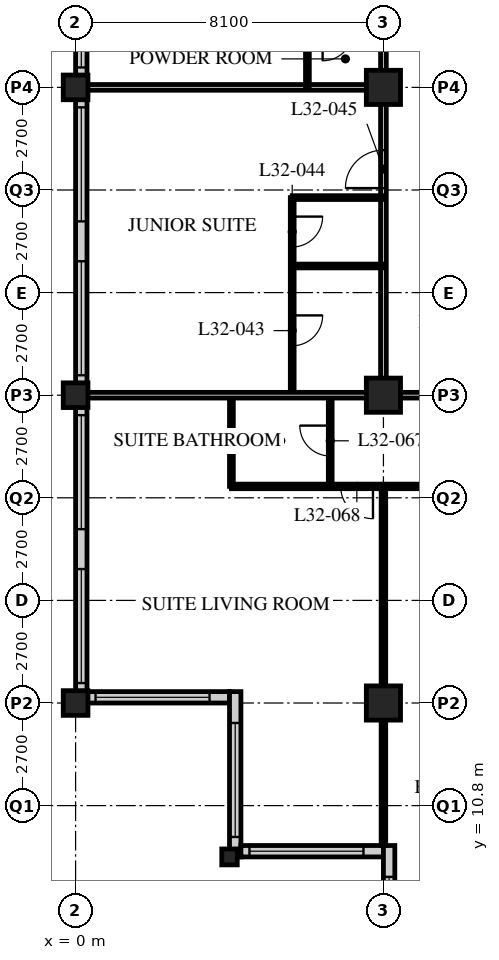
"""IFC4 building model, lengths in metres.
Left out: names, types, materials, properties, quantities, classifications, styles, units other than length and angle.
Written with IfcOpenShell. Run it as: python <this file> out.ifc"""

import sys

from ifc_helpers import new_model, si_unit, direction, frame, frame_2d, origin, origin_2d, place, context, subcontext, project, spatial, rectangle, hollow_rectangle, i_section, extrude, element, fill, save


model = new_model("IFC4")
c1 = context("Model", 3, precision=1e-05, world=origin(), true_north=direction((0.0, 1.0)))
c2 = subcontext(c1, "Body", "Model", "MODEL_VIEW")
j1 = project(units=[si_unit("LENGTHUNIT", "METRE"), si_unit("PLANEANGLEUNIT", "RADIAN")], contexts=[c1])
p1 = place(None, origin())
s1 = spatial("IfcSite", under=j1, at=p1, CompositionType="ELEMENT")
p2 = place(p1, origin())
s2 = spatial("IfcBuilding", under=s1, at=p2, CompositionType="ELEMENT")
p3 = place(p2, frame((0.0, 0.0, 127.2)))
s3 = spatial("IfcBuildingStorey", under=s2, at=p3, CompositionType="ELEMENT", Elevation=127.2)
for number, where, z_axis, x_axis in (
    (1, (0.0, 13.5, 0.0), (0.0, 0.0, 1.0), (1.0, 0.0, 0.0)),
    (2, (0.0, 21.6, 0.0), (0.0, 0.0, 1.0), (1.0, 0.0, 0.0)),
    (3, (0.0, 29.7, 0.0), (0.0, 0.0, 1.0), (1.0, 0.0, 0.0)),
):
    element("IfcColumn", number, at=place(p3, frame(where, z_axis=z_axis, x_axis=x_axis)), inside=s3, PredefinedType="COLUMN", context=c2, shape_type="SweptSolid", body=[
        extrude(hollow_rectangle(XDim=0.65, YDim=0.65, WallThickness=0.055, at=origin_2d()), origin(), (0.0, 0.0, 1.0), 3.4),
    ])
p4 = place(p3, frame((4.05, 9.45, 0.0), z_axis=(0.0, 0.0, 1.0), x_axis=(1.0, 0.0, 0.0)))
e4 = element("IfcColumn", 4, at=p4, inside=s3, PredefinedType="COLUMN", context=c2, shape_type="SweptSolid", body=[
    extrude(i_section(OverallWidth=0.407, OverallDepth=0.419, WebThickness=0.031, FlangeThickness=0.049, FilletRadius=0.015, at=origin_2d()), origin(), (0.0, 0.0, 1.0), 3.4),
])
for number, where, z_axis, x_axis in (
    (5, (8.1, 13.5, 0.0), (0.0, 0.0, 1.0), (1.0, 0.0, 0.0)),
    (6, (8.1, 21.6, 0.0), (0.0, 0.0, 1.0), (1.0, 0.0, 0.0)),
    (7, (8.1, 29.7, 0.0), (0.0, 0.0, 1.0), (1.0, 0.0, 0.0)),
):
    element("IfcColumn", number, at=place(p3, frame(where, z_axis=z_axis, x_axis=x_axis)), inside=s3, PredefinedType="COLUMN", context=c2, shape_type="SweptSolid", body=[
        extrude(hollow_rectangle(XDim=0.9, YDim=0.9, WallThickness=0.09, at=origin_2d()), origin(), (0.0, 0.0, 1.0), 3.4),
    ])
p5 = place(p3, frame((0.15, 45.6, 0.0), z_axis=(0.0, 0.0, 1.0), x_axis=(0.0, -1.0, 0.0)))
e8 = element("IfcWall", 8, at=p5, inside=s3, PredefinedType="SOLIDWALL", context=c2, shape_type="SweptSolid", body=[
    extrude(rectangle(XDim=32.1, YDim=0.3, at=frame_2d((16.05, 0.0))), origin(), (0.0, 0.0, 1.0), 3.19),
])
p6 = place(p5, frame((0.225, 0.0, 0.9)))
e9 = element("IfcOpeningElement", 9, at=p6, cuts=e8, PredefinedType="OPENING", context=c2, shape_type="SweptSolid", body=[
    extrude(rectangle(XDim=3.0, YDim=2.0, at=frame_2d((1.5, 1.0))), frame((0.0, 0.16, 0.0), z_axis=(0.0, -1.0, 0.0), x_axis=(1.0, 0.0, 0.0)), (0.0, 0.0, 1.0), 0.32),
])
p7 = place(p5, frame((4.275, 0.0, 0.9)))
e10 = element("IfcOpeningElement", 10, at=p7, cuts=e8, PredefinedType="OPENING", context=c2, shape_type="SweptSolid", body=[
    extrude(rectangle(XDim=3.0, YDim=2.0, at=frame_2d((1.5, 1.0))), frame((0.0, 0.16, 0.0), z_axis=(0.0, -1.0, 0.0), x_axis=(1.0, 0.0, 0.0)), (0.0, 0.0, 1.0), 0.32),
])
p8 = place(p5, frame((8.325, 0.0, 0.9)))
e11 = element("IfcOpeningElement", 11, at=p8, cuts=e8, PredefinedType="OPENING", context=c2, shape_type="SweptSolid", body=[
    extrude(rectangle(XDim=3.0, YDim=2.0, at=frame_2d((1.5, 1.0))), frame((0.0, 0.16, 0.0), z_axis=(0.0, -1.0, 0.0), x_axis=(1.0, 0.0, 0.0)), (0.0, 0.0, 1.0), 0.32),
])
p9 = place(p5, frame((12.375, 0.0, 0.9)))
e12 = element("IfcOpeningElement", 12, at=p9, cuts=e8, PredefinedType="OPENING", context=c2, shape_type="SweptSolid", body=[
    extrude(rectangle(XDim=3.0, YDim=2.0, at=frame_2d((1.5, 1.0))), frame((0.0, 0.16, 0.0), z_axis=(0.0, -1.0, 0.0), x_axis=(1.0, 0.0, 0.0)), (0.0, 0.0, 1.0), 0.32),
])
p10 = place(p5, frame((16.425, 0.0, 0.9)))
e13 = element("IfcOpeningElement", 13, at=p10, cuts=e8, PredefinedType="OPENING", context=c2, shape_type="SweptSolid", body=[
    extrude(rectangle(XDim=3.0, YDim=2.0, at=frame_2d((1.5, 1.0))), frame((0.0, 0.16, 0.0), z_axis=(0.0, -1.0, 0.0), x_axis=(1.0, 0.0, 0.0)), (0.0, 0.0, 1.0), 0.32),
])
p11 = place(p5, frame((20.475, 0.0, 0.9)))
e14 = element("IfcOpeningElement", 14, at=p11, cuts=e8, PredefinedType="OPENING", context=c2, shape_type="SweptSolid", body=[
    extrude(rectangle(XDim=3.0, YDim=2.0, at=frame_2d((1.5, 1.0))), frame((0.0, 0.16, 0.0), z_axis=(0.0, -1.0, 0.0), x_axis=(1.0, 0.0, 0.0)), (0.0, 0.0, 1.0), 0.32),
])
p12 = place(p5, frame((24.525, 0.0, 0.9)))
e15 = element("IfcOpeningElement", 15, at=p12, cuts=e8, PredefinedType="OPENING", context=c2, shape_type="SweptSolid", body=[
    extrude(rectangle(XDim=3.0, YDim=2.0, at=frame_2d((1.5, 1.0))), frame((0.0, 0.16, 0.0), z_axis=(0.0, -1.0, 0.0), x_axis=(1.0, 0.0, 0.0)), (0.0, 0.0, 1.0), 0.32),
])
p13 = place(p5, frame((28.575, 0.0, 0.9)))
e16 = element("IfcOpeningElement", 16, at=p13, cuts=e8, PredefinedType="OPENING", context=c2, shape_type="SweptSolid", body=[
    extrude(rectangle(XDim=3.0, YDim=2.0, at=frame_2d((1.5, 1.0))), frame((0.0, 0.16, 0.0), z_axis=(0.0, -1.0, 0.0), x_axis=(1.0, 0.0, 0.0)), (0.0, 0.0, 1.0), 0.32),
])
p14 = place(p3, frame((0.3, 13.65, 0.0), z_axis=(0.0, 0.0, 1.0), x_axis=(1.0, 0.0, 0.0)))
e17 = element("IfcWall", 17, at=p14, inside=s3, PredefinedType="SOLIDWALL", context=c2, shape_type="SweptSolid", body=[
    extrude(rectangle(XDim=3.75, YDim=0.3, at=frame_2d((1.875, 0.0))), origin(), (0.0, 0.0, 1.0), 3.19),
])
p15 = place(p14, frame((0.225, 0.0, 0.9)))
e18 = element("IfcOpeningElement", 18, at=p15, cuts=e17, PredefinedType="OPENING", context=c2, shape_type="SweptSolid", body=[
    extrude(rectangle(XDim=3.0, YDim=1.5, at=frame_2d((1.5, 0.75))), frame((0.0, 0.16, 0.0), z_axis=(0.0, -1.0, 0.0), x_axis=(1.0, 0.0, 0.0)), (0.0, 0.0, 1.0), 0.32),
])
p16 = place(p3, frame((4.2, 13.8, 0.0), z_axis=(0.0, 0.0, 1.0), x_axis=(0.0, -1.0, 0.0)))
e19 = element("IfcWall", 19, at=p16, inside=s3, PredefinedType="SOLIDWALL", context=c2, shape_type="SweptSolid", body=[
    extrude(rectangle(XDim=4.35, YDim=0.3, at=frame_2d((2.175, 0.0))), origin(), (0.0, 0.0, 1.0), 3.19),
])
p17 = place(p16, frame((0.825, 0.0, 0.9)))
e20 = element("IfcOpeningElement", 20, at=p17, cuts=e19, PredefinedType="OPENING", context=c2, shape_type="SweptSolid", body=[
    extrude(rectangle(XDim=3.0, YDim=1.5, at=frame_2d((1.5, 0.75))), frame((0.0, 0.16, 0.0), z_axis=(0.0, -1.0, 0.0), x_axis=(1.0, 0.0, 0.0)), (0.0, 0.0, 1.0), 0.32),
])
p18 = place(p3, frame((4.35, 9.6, 0.0), z_axis=(0.0, 0.0, 1.0), x_axis=(1.0, 0.0, 0.0)))
e21 = element("IfcWall", 21, at=p18, inside=s3, PredefinedType="SOLIDWALL", context=c2, shape_type="SweptSolid", body=[
    extrude(rectangle(XDim=3.75, YDim=0.3, at=frame_2d((1.875, 0.0))), origin(), (0.0, 0.0, 1.0), 3.19),
])
p19 = place(p18, frame((0.225, 0.0, 0.9)))
e22 = element("IfcOpeningElement", 22, at=p19, cuts=e21, PredefinedType="OPENING", context=c2, shape_type="SweptSolid", body=[
    extrude(rectangle(XDim=3.0, YDim=1.5, at=frame_2d((1.5, 0.75))), frame((0.0, 0.16, 0.0), z_axis=(0.0, -1.0, 0.0), x_axis=(1.0, 0.0, 0.0)), (0.0, 0.0, 1.0), 0.32),
])
p20 = place(p3, frame((8.25, 9.75, 0.0), z_axis=(0.0, 0.0, 1.0), x_axis=(0.0, -1.0, 0.0)))
e23 = element("IfcWall", 23, at=p20, inside=s3, PredefinedType="SOLIDWALL", context=c2, shape_type="SweptSolid", body=[
    extrude(rectangle(XDim=4.35, YDim=0.3, at=frame_2d((2.175, 0.0))), origin(), (0.0, 0.0, 1.0), 3.19),
])
p21 = place(p20, frame((0.825, 0.0, 0.9)))
e24 = element("IfcOpeningElement", 24, at=p21, cuts=e23, PredefinedType="OPENING", context=c2, shape_type="SweptSolid", body=[
    extrude(rectangle(XDim=3.0, YDim=1.5, at=frame_2d((1.5, 0.75))), frame((0.0, 0.16, 0.0), z_axis=(0.0, -1.0, 0.0), x_axis=(1.0, 0.0, 0.0)), (0.0, 0.0, 1.0), 0.32),
])
p22 = place(p3, frame((8.1, 21.6, 0.0), z_axis=(0.0, 0.0, 1.0), x_axis=(1.0, 0.0, 0.0)))
e25 = element("IfcWall", 25, at=p22, inside=s3, PredefinedType="PARTITIONING", context=c2, shape_type="SweptSolid", body=[
    extrude(rectangle(XDim=40.5, YDim=0.15, at=frame_2d((20.25, 0.0))), origin(), (0.0, 0.0, 1.0), 2.578),
])
p23 = place(p22, frame((9.625, 0.0, 0.0)))
e26 = element("IfcOpeningElement", 26, at=p23, cuts=e25, PredefinedType="OPENING", context=c2, shape_type="SweptSolid", body=[
    extrude(rectangle(XDim=1.0, YDim=2.1, at=frame_2d((0.5, 1.05))), frame((0.0, 0.085, 0.0), z_axis=(0.0, -1.0, 0.0), x_axis=(1.0, 0.0, 0.0)), (0.0, 0.0, 1.0), 0.17),
])
p24 = place(p22, frame((21.775, 0.0, 0.0)))
e27 = element("IfcOpeningElement", 27, at=p24, cuts=e25, PredefinedType="OPENING", context=c2, shape_type="SweptSolid", body=[
    extrude(rectangle(XDim=1.0, YDim=2.1, at=frame_2d((0.5, 1.05))), frame((0.0, 0.085, 0.0), z_axis=(0.0, -1.0, 0.0), x_axis=(1.0, 0.0, 0.0)), (0.0, 0.0, 1.0), 0.17),
])
p25 = place(p22, frame((28.95, 0.0, 0.0)))
e28 = element("IfcOpeningElement", 28, at=p25, cuts=e25, PredefinedType="OPENING", context=c2, shape_type="SweptSolid", body=[
    extrude(rectangle(XDim=1.0, YDim=2.1, at=frame_2d((0.5, 1.05))), frame((0.0, 0.085, 0.0), z_axis=(0.0, -1.0, 0.0), x_axis=(1.0, 0.0, 0.0)), (0.0, 0.0, 1.0), 0.17),
])
p26 = place(p22, frame((34.85, 0.0, 0.0)))
e29 = element("IfcOpeningElement", 29, at=p26, cuts=e25, PredefinedType="OPENING", context=c2, shape_type="SweptSolid", body=[
    extrude(rectangle(XDim=1.0, YDim=2.1, at=frame_2d((0.5, 1.05))), frame((0.0, 0.085, 0.0), z_axis=(0.0, -1.0, 0.0), x_axis=(1.0, 0.0, 0.0)), (0.0, 0.0, 1.0), 0.17),
])
p27 = place(p22, frame((1.525, 0.0, 0.0)))
e30 = element("IfcOpeningElement", 30, at=p27, cuts=e25, PredefinedType="OPENING", context=c2, shape_type="SweptSolid", body=[
    extrude(rectangle(XDim=1.0, YDim=2.1, at=frame_2d((0.5, 1.05))), frame((0.0, 0.085, 0.0), z_axis=(0.0, -1.0, 0.0), x_axis=(1.0, 0.0, 0.0)), (0.0, 0.0, 1.0), 0.17),
])
p28 = place(p22, frame((37.975, 0.0, 0.0)))
e31 = element("IfcOpeningElement", 31, at=p28, cuts=e25, PredefinedType="OPENING", context=c2, shape_type="SweptSolid", body=[
    extrude(rectangle(XDim=1.0, YDim=2.1, at=frame_2d((0.5, 1.05))), frame((0.0, 0.085, 0.0), z_axis=(0.0, -1.0, 0.0), x_axis=(1.0, 0.0, 0.0)), (0.0, 0.0, 1.0), 0.17),
])
p29 = place(p3, frame((8.1, 21.6, 0.0), z_axis=(0.0, 0.0, 1.0), x_axis=(0.0, 1.0, 0.0)))
e32 = element("IfcWall", 32, at=p29, inside=s3, PredefinedType="PARTITIONING", context=c2, shape_type="SweptSolid", body=[
    extrude(rectangle(XDim=24.3, YDim=0.15, at=frame_2d((12.15, 0.0))), origin(), (0.0, 0.0, 1.0), 2.578),
])
p30 = place(p29, frame((5.45, 0.0, 0.0)))
e33 = element("IfcOpeningElement", 33, at=p30, cuts=e32, PredefinedType="OPENING", context=c2, shape_type="SweptSolid", body=[
    extrude(rectangle(XDim=1.0, YDim=2.1, at=frame_2d((0.5, 1.05))), frame((0.0, 0.085, 0.0), z_axis=(0.0, -1.0, 0.0), x_axis=(1.0, 0.0, 0.0)), (0.0, 0.0, 1.0), 0.17),
])
p31 = place(p29, frame((10.0, 0.0, 0.0)))
e34 = element("IfcOpeningElement", 34, at=p31, cuts=e32, PredefinedType="OPENING", context=c2, shape_type="SweptSolid", body=[
    extrude(rectangle(XDim=1.0, YDim=2.1, at=frame_2d((0.5, 1.05))), frame((0.0, 0.085, 0.0), z_axis=(0.0, -1.0, 0.0), x_axis=(1.0, 0.0, 0.0)), (0.0, 0.0, 1.0), 0.17),
])
p32 = place(p29, frame((21.65, 0.0, 0.0)))
e35 = element("IfcOpeningElement", 35, at=p32, cuts=e32, PredefinedType="OPENING", context=c2, shape_type="SweptSolid", body=[
    extrude(rectangle(XDim=1.0, YDim=2.1, at=frame_2d((0.5, 1.05))), frame((0.0, 0.085, 0.0), z_axis=(0.0, -1.0, 0.0), x_axis=(1.0, 0.0, 0.0)), (0.0, 0.0, 1.0), 0.17),
])
p33 = place(p3, frame((5.7, 21.6, 0.0), z_axis=(0.0, 0.0, 1.0), x_axis=(0.0, 1.0, 0.0)))
e36 = element("IfcWall", 36, at=p33, inside=s3, PredefinedType="PARTITIONING", context=c2, shape_type="SweptSolid", body=[
    extrude(rectangle(XDim=5.2, YDim=0.1, at=frame_2d((2.6, 0.0))), origin(), (0.0, 0.0, 1.0), 3.19),
])
p34 = place(p33, frame((1.3, 0.0, 0.0)))
e37 = element("IfcOpeningElement", 37, at=p34, cuts=e36, PredefinedType="OPENING", context=c2, shape_type="SweptSolid", body=[
    extrude(rectangle(XDim=0.8, YDim=2.1, at=frame_2d((0.4, 1.05))), frame((0.0, 0.06, 0.0), z_axis=(0.0, -1.0, 0.0), x_axis=(1.0, 0.0, 0.0)), (0.0, 0.0, 1.0), 0.12),
])
p35 = place(p33, frame((3.9, 0.0, 0.0)))
e38 = element("IfcOpeningElement", 38, at=p35, cuts=e36, PredefinedType="OPENING", context=c2, shape_type="SweptSolid", body=[
    extrude(rectangle(XDim=0.8, YDim=2.1, at=frame_2d((0.4, 1.05))), frame((0.0, 0.06, 0.0), z_axis=(0.0, -1.0, 0.0), x_axis=(1.0, 0.0, 0.0)), (0.0, 0.0, 1.0), 0.12),
])
for number, where, z_axis, x_axis in (
    (39, (8.1, 25.0, 0.0), (0.0, 0.0, 1.0), (-1.0, 0.0, 0.0)),
    (40, (8.1, 26.8, 0.0), (0.0, 0.0, 1.0), (-1.0, 0.0, 0.0)),
):
    element("IfcWall", number, at=place(p3, frame(where, z_axis=z_axis, x_axis=x_axis)), inside=s3, PredefinedType="PARTITIONING", context=c2, shape_type="SweptSolid", body=[
        extrude(rectangle(XDim=2.4, YDim=0.1, at=frame_2d((1.2, 0.0))), origin(), (0.0, 0.0, 1.0), 3.19),
    ])
p36 = place(p3, frame((8.1, 29.7, 0.0), z_axis=(0.0, 0.0, 1.0), x_axis=(-1.0, 0.0, 0.0)))
e41 = element("IfcWall", 41, at=p36, inside=s3, PredefinedType="PARTITIONING", context=c2, shape_type="SweptSolid", body=[
    extrude(rectangle(XDim=7.8, YDim=0.15, at=frame_2d((3.9, 0.0))), origin(), (0.0, 0.0, 1.0), 2.578),
])
p37 = place(p3, frame((6.1, 29.7, 0.0), z_axis=(0.0, 0.0, 1.0), x_axis=(0.0, 1.0, 0.0)))
e42 = element("IfcWall", 42, at=p37, inside=s3, PredefinedType="PARTITIONING", context=c2, shape_type="SweptSolid", body=[
    extrude(rectangle(XDim=1.5, YDim=0.1, at=frame_2d((0.75, 0.0))), origin(), (0.0, 0.0, 1.0), 3.19),
])
p38 = place(p3, frame((6.7, 21.6, 0.0), z_axis=(0.0, 0.0, 1.0), x_axis=(0.0, -1.0, 0.0)))
e43 = element("IfcWall", 43, at=p38, inside=s3, PredefinedType="PARTITIONING", context=c2, shape_type="SweptSolid", body=[
    extrude(rectangle(XDim=2.4, YDim=0.1, at=frame_2d((1.2, 0.0))), origin(), (0.0, 0.0, 1.0), 3.19),
])
p39 = place(p38, frame((0.8, 0.0, 0.0)))
e44 = element("IfcOpeningElement", 44, at=p39, cuts=e43, PredefinedType="OPENING", context=c2, shape_type="SweptSolid", body=[
    extrude(rectangle(XDim=0.8, YDim=2.1, at=frame_2d((0.4, 1.05))), frame((0.0, 0.06, 0.0), z_axis=(0.0, -1.0, 0.0), x_axis=(1.0, 0.0, 0.0)), (0.0, 0.0, 1.0), 0.12),
])
p40 = place(p3, frame((4.1, 21.6, 0.0), z_axis=(0.0, 0.0, 1.0), x_axis=(0.0, -1.0, 0.0)))
e45 = element("IfcWall", 45, at=p40, inside=s3, PredefinedType="PARTITIONING", context=c2, shape_type="SweptSolid", body=[
    extrude(rectangle(XDim=2.4, YDim=0.1, at=frame_2d((1.2, 0.0))), origin(), (0.0, 0.0, 1.0), 3.19),
])
p41 = place(p3, frame((4.1, 19.2, 0.0), z_axis=(0.0, 0.0, 1.0), x_axis=(1.0, 0.0, 0.0)))
e46 = element("IfcWall", 46, at=p41, inside=s3, PredefinedType="PARTITIONING", context=c2, shape_type="SweptSolid", body=[
    extrude(rectangle(XDim=8.05, YDim=0.12, at=frame_2d((4.025, 0.0))), origin(), (0.0, 0.0, 1.0), 3.19),
])
p42 = place(p41, frame((6.725, 0.0, 0.0)))
e47 = element("IfcOpeningElement", 47, at=p42, cuts=e46, PredefinedType="OPENING", context=c2, shape_type="SweptSolid", body=[
    extrude(rectangle(XDim=0.85, YDim=2.1, at=frame_2d((0.425, 1.05))), frame((0.0, 0.07, 0.0), z_axis=(0.0, -1.0, 0.0), x_axis=(1.0, 0.0, 0.0)), (0.0, 0.0, 1.0), 0.14),
])
p43 = place(p41, frame((2.875, 0.0, 0.0)))
e48 = element("IfcOpeningElement", 48, at=p43, cuts=e46, PredefinedType="OPENING", context=c2, shape_type="SweptSolid", body=[
    extrude(rectangle(XDim=0.85, YDim=2.1, at=frame_2d((0.425, 1.05))), frame((0.0, 0.07, 0.0), z_axis=(0.0, -1.0, 0.0), x_axis=(1.0, 0.0, 0.0)), (0.0, 0.0, 1.0), 0.14),
])
p44 = place(p3, frame((8.1, 19.2, 0.0), z_axis=(0.0, 0.0, 1.0), x_axis=(0.0, -1.0, 0.0)))
e49 = element("IfcWall", 49, at=p44, inside=s3, PredefinedType="PARTITIONING", context=c2, shape_type="SweptSolid", body=[
    extrude(rectangle(XDim=9.45, YDim=0.12, at=frame_2d((4.725, 0.0))), origin(), (0.0, 0.0, 1.0), 2.578),
])
p45 = place(p3, frame((0.3, 21.6, 0.0), z_axis=(0.0, 0.0, 1.0), x_axis=(1.0, 0.0, 0.0)))
e50 = element("IfcWall", 50, at=p45, inside=s3, PredefinedType="PARTITIONING", context=c2, shape_type="SweptSolid", body=[
    extrude(rectangle(XDim=7.8, YDim=0.15, at=frame_2d((3.9, 0.0))), origin(), (0.0, 0.0, 1.0), 2.578),
])
p46 = place(p9, origin())
e51 = element("IfcWindow", 51, at=p46, inside=s3, PartitioningType="SINGLE_PANEL", PredefinedType="WINDOW", context=c2, shape_type="SweptSolid", body=[
    extrude(rectangle(XDim=3.0, YDim=2.0, at=frame_2d((1.5, 1.0))), frame((0.0, 0.03, 0.0), z_axis=(0.0, -1.0, 0.0), x_axis=(1.0, 0.0, 0.0)), (0.0, 0.0, 1.0), 0.06),
])
fill(e12, e51)
p47 = place(p10, origin())
e52 = element("IfcWindow", 52, at=p47, inside=s3, PartitioningType="SINGLE_PANEL", PredefinedType="WINDOW", context=c2, shape_type="SweptSolid", body=[
    extrude(rectangle(XDim=3.0, YDim=2.0, at=frame_2d((1.5, 1.0))), frame((0.0, 0.03, 0.0), z_axis=(0.0, -1.0, 0.0), x_axis=(1.0, 0.0, 0.0)), (0.0, 0.0, 1.0), 0.06),
])
fill(e13, e52)
p48 = place(p11, origin())
e53 = element("IfcWindow", 53, at=p48, inside=s3, PartitioningType="SINGLE_PANEL", PredefinedType="WINDOW", context=c2, shape_type="SweptSolid", body=[
    extrude(rectangle(XDim=3.0, YDim=2.0, at=frame_2d((1.5, 1.0))), frame((0.0, 0.03, 0.0), z_axis=(0.0, -1.0, 0.0), x_axis=(1.0, 0.0, 0.0)), (0.0, 0.0, 1.0), 0.06),
])
fill(e14, e53)
p49 = place(p12, origin())
e54 = element("IfcWindow", 54, at=p49, inside=s3, PartitioningType="SINGLE_PANEL", PredefinedType="WINDOW", context=c2, shape_type="SweptSolid", body=[
    extrude(rectangle(XDim=3.0, YDim=2.0, at=frame_2d((1.5, 1.0))), frame((0.0, 0.03, 0.0), z_axis=(0.0, -1.0, 0.0), x_axis=(1.0, 0.0, 0.0)), (0.0, 0.0, 1.0), 0.06),
])
fill(e15, e54)
p50 = place(p13, origin())
e55 = element("IfcWindow", 55, at=p50, inside=s3, PartitioningType="SINGLE_PANEL", PredefinedType="WINDOW", context=c2, shape_type="SweptSolid", body=[
    extrude(rectangle(XDim=3.0, YDim=2.0, at=frame_2d((1.5, 1.0))), frame((0.0, 0.03, 0.0), z_axis=(0.0, -1.0, 0.0), x_axis=(1.0, 0.0, 0.0)), (0.0, 0.0, 1.0), 0.06),
])
fill(e16, e55)
p51 = place(p15, origin())
e56 = element("IfcWindow", 56, at=p51, inside=s3, PartitioningType="SINGLE_PANEL", PredefinedType="WINDOW", context=c2, shape_type="SweptSolid", body=[
    extrude(rectangle(XDim=3.0, YDim=1.5, at=frame_2d((1.5, 0.75))), frame((0.0, 0.03, 0.0), z_axis=(0.0, -1.0, 0.0), x_axis=(1.0, 0.0, 0.0)), (0.0, 0.0, 1.0), 0.06),
])
fill(e18, e56)
p52 = place(p17, origin())
e57 = element("IfcWindow", 57, at=p52, inside=s3, PartitioningType="SINGLE_PANEL", PredefinedType="WINDOW", context=c2, shape_type="SweptSolid", body=[
    extrude(rectangle(XDim=3.0, YDim=1.5, at=frame_2d((1.5, 0.75))), frame((0.0, 0.03, 0.0), z_axis=(0.0, -1.0, 0.0), x_axis=(1.0, 0.0, 0.0)), (0.0, 0.0, 1.0), 0.06),
])
fill(e20, e57)
p53 = place(p19, origin())
e58 = element("IfcWindow", 58, at=p53, inside=s3, PartitioningType="SINGLE_PANEL", PredefinedType="WINDOW", context=c2, shape_type="SweptSolid", body=[
    extrude(rectangle(XDim=3.0, YDim=1.5, at=frame_2d((1.5, 0.75))), frame((0.0, 0.03, 0.0), z_axis=(0.0, -1.0, 0.0), x_axis=(1.0, 0.0, 0.0)), (0.0, 0.0, 1.0), 0.06),
])
fill(e22, e58)
p54 = place(p21, origin())
e59 = element("IfcWindow", 59, at=p54, inside=s3, PartitioningType="SINGLE_PANEL", PredefinedType="WINDOW", context=c2, shape_type="SweptSolid", body=[
    extrude(rectangle(XDim=3.0, YDim=1.5, at=frame_2d((1.5, 0.75))), frame((0.0, 0.03, 0.0), z_axis=(0.0, -1.0, 0.0), x_axis=(1.0, 0.0, 0.0)), (0.0, 0.0, 1.0), 0.06),
])
fill(e24, e59)
p55 = place(p34, origin())
e60 = element("IfcDoor", 60, at=p55, inside=s3, OperationType="SINGLE_SWING_LEFT", PredefinedType="DOOR", context=c2, shape_type="SweptSolid", body=[
    extrude(rectangle(XDim=0.8, YDim=2.1, at=frame_2d((0.4, 1.05))), frame((0.0, 0.025, 0.0), z_axis=(0.0, -1.0, 0.0), x_axis=(1.0, 0.0, 0.0)), (0.0, 0.0, 1.0), 0.05),
])
fill(e37, e60)
p56 = place(p35, origin())
e61 = element("IfcDoor", 61, at=p56, inside=s3, OperationType="SINGLE_SWING_LEFT", PredefinedType="DOOR", context=c2, shape_type="SweptSolid", body=[
    extrude(rectangle(XDim=0.8, YDim=2.1, at=frame_2d((0.4, 1.05))), frame((0.0, 0.025, 0.0), z_axis=(0.0, -1.0, 0.0), x_axis=(1.0, 0.0, 0.0)), (0.0, 0.0, 1.0), 0.05),
])
fill(e38, e61)
p57 = place(p30, origin())
e62 = element("IfcDoor", 62, at=p57, inside=s3, OperationType="SINGLE_SWING_LEFT", PredefinedType="DOOR", context=c2, shape_type="SweptSolid", body=[
    extrude(rectangle(XDim=1.0, YDim=2.1, at=frame_2d((0.5, 1.05))), frame((0.0, 0.025, 0.0), z_axis=(0.0, -1.0, 0.0), x_axis=(1.0, 0.0, 0.0)), (0.0, 0.0, 1.0), 0.05),
])
fill(e33, e62)
p58 = place(p39, origin())
e63 = element("IfcDoor", 63, at=p58, inside=s3, OperationType="SINGLE_SWING_RIGHT", PredefinedType="DOOR", context=c2, shape_type="SweptSolid", body=[
    extrude(rectangle(XDim=0.8, YDim=2.1, at=frame_2d((0.4, 1.05))), frame((0.0, 0.025, 0.0), z_axis=(0.0, -1.0, 0.0), x_axis=(1.0, 0.0, 0.0)), (0.0, 0.0, 1.0), 0.05),
])
fill(e44, e63)
p59 = place(p43, origin())
e64 = element("IfcDoor", 64, at=p59, inside=s3, OperationType="SINGLE_SWING_LEFT", PredefinedType="DOOR", context=c2, shape_type="SweptSolid", body=[
    extrude(rectangle(XDim=0.85, YDim=2.1, at=frame_2d((0.425, 1.05))), frame((0.0, 0.025, 0.0), z_axis=(0.0, -1.0, 0.0), x_axis=(1.0, 0.0, 0.0)), (0.0, 0.0, 1.0), 0.05),
])
fill(e48, e64)
save(model, sys.argv[1])
